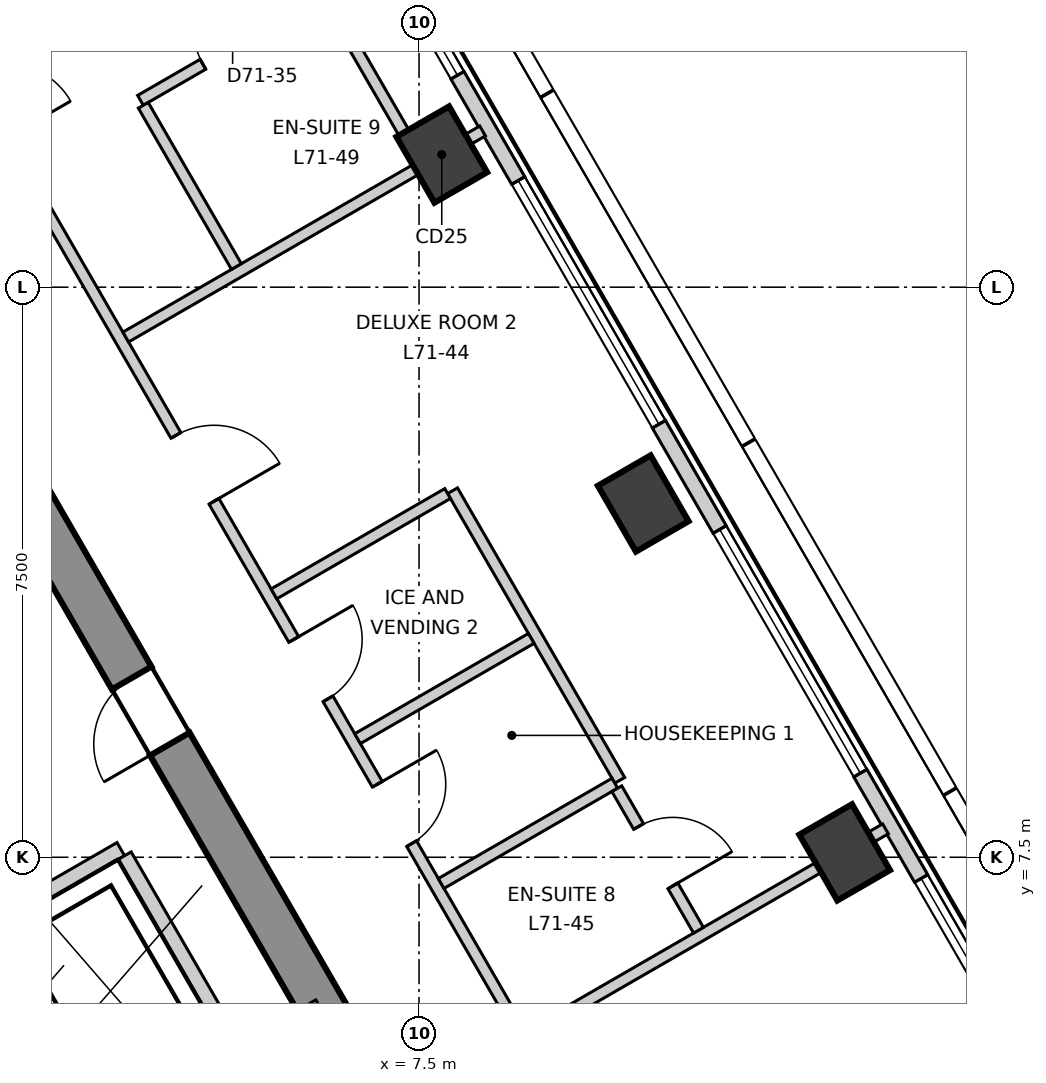
"""IFC4 building model, lengths in metres.
Left out: names, types, materials, properties, quantities, classifications, styles, units other than length and angle.
Written with IfcOpenShell. Run it as: python <this file> out.ifc"""

import sys

from ifc_helpers import new_model, si_unit, direction, frame, frame_2d, origin, origin_2d, place, context, subcontext, project, spatial, polyline, rectangle, outline, extrude, element, fill, save


model = new_model("IFC4")
c1 = context("Model", 3, precision=1e-05, world=origin(), true_north=direction((0.0, 1.0)))
c2 = subcontext(c1, "Body", "Model", "MODEL_VIEW")
j1 = project(units=[si_unit("LENGTHUNIT", "METRE"), si_unit("PLANEANGLEUNIT", "RADIAN")], contexts=[c1])
p1 = place(None, origin())
s1 = spatial("IfcSite", under=j1, at=p1, CompositionType="ELEMENT")
p2 = place(p1, origin())
s2 = spatial("IfcBuilding", under=s1, at=p2, CompositionType="ELEMENT")
p3 = place(p2, frame((0.0, 0.0, 300.7)))
s3 = spatial("IfcBuildingStorey", under=s2, at=p3, CompositionType="ELEMENT", Elevation=300.7)
p4 = place(p3, frame((12.384, -5.15, -0.3), z_axis=(0.0, 0.0, 1.0), x_axis=(-0.500000539815, 0.866025092122, 0.0)))
e1 = element("IfcWall", 1, at=p4, inside=s3, PredefinedType="SHEAR", context=c2, shape_type="SweptSolid", body=[
    extrude(outline(polyline([(-0.173, -0.301), (1.795, -0.301), (3.763, -0.301), (5.731, -0.301), (7.7, -0.301), (9.668, -0.301), (11.636, -0.301), (13.604, -0.3), (15.573, -0.3), (17.541, -0.3), (19.509, -0.3), (21.477, -0.3), (21.131, 0.3), (19.226, 0.3), (17.321, 0.3), (15.415, 0.3), (13.51, 0.3), (11.605, 0.3), (9.699, 0.3), (7.794, 0.3), (5.889, 0.3), (3.984, 0.3), (2.078, 0.3), (0.173, 0.3), (-0.173, -0.301)])), origin(), (0.0, 0.0, 1.0), 3.6),
])
p5 = place(p4, frame((16.328, 0.0, 0.3)))
e2 = element("IfcOpeningElement", 2, at=p5, cuts=e1, PredefinedType="OPENING", context=c2, shape_type="SweptSolid", body=[
    extrude(rectangle(XDim=1.0, YDim=2.1, at=frame_2d((0.5, 1.05))), frame((0.0, 0.31, 0.0), z_axis=(0.0, -1.0, 0.0), x_axis=(1.0, 0.0, 0.0)), (0.0, 0.0, 1.0), 0.621),
])
p6 = place(p4, frame((4.777, 0.0, 0.3)))
e3 = element("IfcOpeningElement", 3, at=p6, cuts=e1, PredefinedType="OPENING", context=c2, shape_type="SweptSolid", body=[
    extrude(rectangle(XDim=0.9, YDim=2.1, at=frame_2d((0.45, 1.05))), frame((0.0, 0.31, 0.0), z_axis=(0.0, -1.0, 0.0), x_axis=(1.0, 0.0, 0.0)), (0.0, 0.0, 1.0), 0.621),
])
for number, where, z_axis, x_axis in (
    (4, (13.1, 7.564, -0.3), (0.0, 0.0, 1.0), (-0.5, 0.866, 0.0)),
    (5, (10.45, 12.154, -0.3), (0.0, 0.0, 1.0), (-0.5, 0.866, 0.0)),
    (6, (7.799, 16.745, -0.3), (0.0, 0.0, 1.0), (-0.5, 0.866, 0.0)),
):
    element("IfcColumn", number, at=place(p3, frame(where, z_axis=z_axis, x_axis=x_axis)), inside=s3, PredefinedType="COLUMN", context=c2, shape_type="SweptSolid", body=[
        extrude(rectangle(XDim=1.0, YDim=0.8, at=origin_2d()), origin(), (0.0, 0.0, 1.0), 3.6),
    ])
p7 = place(p3, frame((24.96, -11.578, 0.0), z_axis=(0.0, 0.0, 1.0), x_axis=(-0.500002391419, 0.866024023094, 0.0)))
e7 = element("IfcWall", 7, at=p7, inside=s3, PredefinedType="ELEMENTEDWALL", context=c2, shape_type="SweptSolid", body=[
    extrude(rectangle(XDim=44.994, YDim=0.2, at=frame_2d((22.497, 0.0))), origin(), (0.0, 0.0, 1.0), 3.3),
])
p8 = place(p7, frame((2.103, 0.0, 0.9)))
e8 = element("IfcOpeningElement", 8, at=p8, cuts=e7, PredefinedType="OPENING", context=c2, shape_type="SweptSolid", body=[
    extrude(rectangle(XDim=3.7, YDim=2.2, at=frame_2d((1.85, 1.1))), frame((0.0, 0.11, 0.0), z_axis=(0.0, -1.0, 0.0), x_axis=(1.0, 0.0, 0.0)), (0.0, 0.0, 1.0), 0.22),
])
p9 = place(p7, frame((7.404, 0.0, 0.9)))
e9 = element("IfcOpeningElement", 9, at=p9, cuts=e7, PredefinedType="OPENING", context=c2, shape_type="SweptSolid", body=[
    extrude(rectangle(XDim=3.7, YDim=2.2, at=frame_2d((1.85, 1.1))), frame((0.0, 0.11, 0.0), z_axis=(0.0, -1.0, 0.0), x_axis=(1.0, 0.0, 0.0)), (0.0, 0.0, 1.0), 0.22),
])
p10 = place(p7, frame((12.705, 0.0, 0.9)))
e10 = element("IfcOpeningElement", 10, at=p10, cuts=e7, PredefinedType="OPENING", context=c2, shape_type="SweptSolid", body=[
    extrude(rectangle(XDim=3.7, YDim=2.2, at=frame_2d((1.85, 1.1))), frame((0.0, 0.11, 0.0), z_axis=(0.0, -1.0, 0.0), x_axis=(1.0, 0.0, 0.0)), (0.0, 0.0, 1.0), 0.22),
])
p11 = place(p7, frame((18.006, 0.0, 0.9)))
e11 = element("IfcOpeningElement", 11, at=p11, cuts=e7, PredefinedType="OPENING", context=c2, shape_type="SweptSolid", body=[
    extrude(rectangle(XDim=3.7, YDim=2.2, at=frame_2d((1.85, 1.1))), frame((0.0, 0.11, 0.0), z_axis=(0.0, -1.0, 0.0), x_axis=(1.0, 0.0, 0.0)), (0.0, 0.0, 1.0), 0.22),
])
p12 = place(p7, frame((23.308, 0.0, 0.9)))
e12 = element("IfcOpeningElement", 12, at=p12, cuts=e7, PredefinedType="OPENING", context=c2, shape_type="SweptSolid", body=[
    extrude(rectangle(XDim=3.7, YDim=2.2, at=frame_2d((1.85, 1.1))), frame((0.0, 0.11, 0.0), z_axis=(0.0, -1.0, 0.0), x_axis=(1.0, 0.0, 0.0)), (0.0, 0.0, 1.0), 0.22),
])
p13 = place(p7, frame((28.609, 0.0, 0.9)))
e13 = element("IfcOpeningElement", 13, at=p13, cuts=e7, PredefinedType="OPENING", context=c2, shape_type="SweptSolid", body=[
    extrude(rectangle(XDim=3.7, YDim=2.2, at=frame_2d((1.85, 1.1))), frame((0.0, 0.11, 0.0), z_axis=(0.0, -1.0, 0.0), x_axis=(1.0, 0.0, 0.0)), (0.0, 0.0, 1.0), 0.22),
])
p14 = place(p7, frame((33.91, 0.0, 0.9)))
e14 = element("IfcOpeningElement", 14, at=p14, cuts=e7, PredefinedType="OPENING", context=c2, shape_type="SweptSolid", body=[
    extrude(rectangle(XDim=3.7, YDim=2.2, at=frame_2d((1.85, 1.1))), frame((0.0, 0.11, 0.0), z_axis=(0.0, -1.0, 0.0), x_axis=(1.0, 0.0, 0.0)), (0.0, 0.0, 1.0), 0.22),
])
p15 = place(p7, frame((39.211, 0.0, 0.9)))
e15 = element("IfcOpeningElement", 15, at=p15, cuts=e7, PredefinedType="OPENING", context=c2, shape_type="SweptSolid", body=[
    extrude(rectangle(XDim=3.7, YDim=2.2, at=frame_2d((1.85, 1.1))), frame((0.0, 0.11, 0.0), z_axis=(0.0, -1.0, 0.0), x_axis=(1.0, 0.0, 0.0)), (0.0, 0.0, 1.0), 0.22),
])
p16 = place(p3, frame((8.942, 5.163, 0.0), z_axis=(0.0, 0.0, 1.0), x_axis=(0.866006352826, 0.500032995777, 0.0)))
e16 = element("IfcWall", 16, at=p16, inside=s3, PredefinedType="PARTITIONING", context=c2, shape_type="SweptSolid", body=[
    extrude(rectangle(XDim=5.422, YDim=0.15, at=frame_2d((2.711, 0.0))), origin(), (0.0, 0.0, 1.0), 2.8),
])
p17 = place(p3, frame((0.075, 20.37, 0.0), z_axis=(0.0, 0.0, 1.0), x_axis=(0.500009775255, -0.866019759965, 0.0)))
e17 = element("IfcWall", 17, at=p17, inside=s3, PredefinedType="PARTITIONING", context=c2, shape_type="SweptSolid", body=[
    extrude(rectangle(XDim=35.207, YDim=0.15, at=frame_2d((17.604, 0.0))), origin(), (0.0, 0.0, 1.0), 3.3),
])
p18 = place(p17, frame((31.307, 0.0, 0.0)))
e18 = element("IfcOpeningElement", 18, at=p18, cuts=e17, PredefinedType="OPENING", context=c2, shape_type="SweptSolid", body=[
    extrude(rectangle(XDim=1.0, YDim=2.1, at=frame_2d((0.5, 1.05))), frame((0.0, 0.085, 0.0), z_axis=(0.0, -1.0, 0.0), x_axis=(1.0, 0.0, 0.0)), (0.0, 0.0, 1.0), 0.17),
])
p19 = place(p17, frame((20.355, 0.0, 0.0)))
e19 = element("IfcOpeningElement", 19, at=p19, cuts=e17, PredefinedType="OPENING", context=c2, shape_type="SweptSolid", body=[
    extrude(rectangle(XDim=1.0, YDim=2.1, at=frame_2d((0.5, 1.05))), frame((0.0, 0.085, 0.0), z_axis=(0.0, -1.0, 0.0), x_axis=(1.0, 0.0, 0.0)), (0.0, 0.0, 1.0), 0.17),
])
p20 = place(p17, frame((24.355, 0.0, 0.0)))
e20 = element("IfcOpeningElement", 20, at=p20, cuts=e17, PredefinedType="OPENING", context=c2, shape_type="SweptSolid", body=[
    extrude(rectangle(XDim=0.9, YDim=2.1, at=frame_2d((0.45, 1.05))), frame((0.0, 0.085, 0.0), z_axis=(0.0, -1.0, 0.0), x_axis=(1.0, 0.0, 0.0)), (0.0, 0.0, 1.0), 0.17),
])
p21 = place(p17, frame((22.255, 0.0, 0.0)))
e21 = element("IfcOpeningElement", 21, at=p21, cuts=e17, PredefinedType="OPENING", context=c2, shape_type="SweptSolid", body=[
    extrude(rectangle(XDim=0.9, YDim=2.1, at=frame_2d((0.45, 1.05))), frame((0.0, 0.085, 0.0), z_axis=(0.0, -1.0, 0.0), x_axis=(1.0, 0.0, 0.0)), (0.0, 0.0, 1.0), 0.17),
])
p22 = place(p17, frame((8.453, 0.0, 0.0)))
e22 = element("IfcOpeningElement", 22, at=p22, cuts=e17, PredefinedType="OPENING", context=c2, shape_type="SweptSolid", body=[
    extrude(rectangle(XDim=1.0, YDim=2.1, at=frame_2d((0.5, 1.05))), frame((0.0, 0.085, 0.0), z_axis=(0.0, -1.0, 0.0), x_axis=(1.0, 0.0, 0.0)), (0.0, 0.0, 1.0), 0.17),
])
p23 = place(p17, frame((13.753, 0.0, 0.0)))
e23 = element("IfcOpeningElement", 23, at=p23, cuts=e17, PredefinedType="OPENING", context=c2, shape_type="SweptSolid", body=[
    extrude(rectangle(XDim=0.9, YDim=2.1, at=frame_2d((0.45, 1.05))), frame((0.0, 0.085, 0.0), z_axis=(0.0, -1.0, 0.0), x_axis=(1.0, 0.0, 0.0)), (0.0, 0.0, 1.0), 0.17),
])
p24 = place(p17, frame((11.553, 0.0, 0.0)))
e24 = element("IfcOpeningElement", 24, at=p24, cuts=e17, PredefinedType="OPENING", context=c2, shape_type="SweptSolid", body=[
    extrude(rectangle(XDim=0.9, YDim=2.1, at=frame_2d((0.45, 1.05))), frame((0.0, 0.085, 0.0), z_axis=(0.0, -1.0, 0.0), x_axis=(1.0, 0.0, 0.0)), (0.0, 0.0, 1.0), 0.17),
])
p25 = place(p17, frame((2.951, 0.0, 0.0)))
e25 = element("IfcOpeningElement", 25, at=p25, cuts=e17, PredefinedType="OPENING", context=c2, shape_type="SweptSolid", body=[
    extrude(rectangle(XDim=1.0, YDim=2.1, at=frame_2d((0.5, 1.05))), frame((0.0, 0.085, 0.0), z_axis=(0.0, -1.0, 0.0), x_axis=(1.0, 0.0, 0.0)), (0.0, 0.0, 1.0), 0.17),
])
p26 = place(p3, frame((3.641, 14.344, 0.0), z_axis=(0.0, 0.0, 1.0), x_axis=(0.865995092734, 0.500052496605, 0.0)))
e26 = element("IfcWall", 26, at=p26, inside=s3, PredefinedType="PARTITIONING", context=c2, shape_type="SweptSolid", body=[
    extrude(rectangle(XDim=5.421, YDim=0.15, at=frame_2d((2.711, 0.0))), origin(), (0.0, 0.0, 1.0), 3.3),
])
p27 = place(p3, frame((7.941, 12.322, 0.0), z_axis=(0.0, 0.0, 1.0), x_axis=(0.500077893725, -0.86598042715, 0.0)))
e27 = element("IfcWall", 27, at=p27, inside=s3, PredefinedType="PARTITIONING", context=c2, shape_type="SweptSolid", body=[
    extrude(rectangle(XDim=4.4, YDim=0.15, at=frame_2d((2.2, 0.0))), origin(), (0.0, 0.0, 1.0), 3.3),
])
p28 = place(p3, frame((5.591, 10.965, 0.0), z_axis=(0.0, 0.0, 1.0), x_axis=(0.86592206805, 0.500178940045, 0.0)))
e28 = element("IfcWall", 28, at=p28, inside=s3, PredefinedType="PARTITIONING", context=c2, shape_type="SweptSolid", body=[
    extrude(rectangle(XDim=2.639, YDim=0.15, at=frame_2d((1.319, 0.0))), origin(), (0.0, 0.0, 1.0), 3.3),
])
for number, where, z_axis, x_axis in (
    (29, (6.691, 9.06, 0.0), (0.0, 0.0, 1.0), (0.866, 0.5, 0.0)),
    (30, (7.791, 7.155, 0.0), (0.0, 0.0, 1.0), (0.866, 0.5, 0.0)),
):
    element("IfcWall", number, at=place(p3, frame(where, z_axis=z_axis, x_axis=x_axis)), inside=s3, PredefinedType="PARTITIONING", context=c2, shape_type="SweptSolid", body=[
        extrude(rectangle(XDim=2.638, YDim=0.15, at=frame_2d((1.319, 0.0))), origin(), (0.0, 0.0, 1.0), 3.3),
    ])
p29 = place(p3, frame((6.249, 18.853, 0.0), z_axis=(0.0, 0.0, 1.0), x_axis=(0.500079482444, -0.865979509711, 0.0)))
e31 = element("IfcWall", 31, at=p29, inside=s3, PredefinedType="PARTITIONING", context=c2, shape_type="SweptSolid", body=[
    extrude(rectangle(XDim=2.525, YDim=0.15, at=frame_2d((1.263, 0.0))), origin(), (0.0, 0.0, 1.0), 2.6),
])
p30 = place(p3, frame((3.835, 17.458, 0.0), z_axis=(0.0, 0.0, 1.0), x_axis=(0.866008795918, 0.500028764566, 0.0)))
e32 = element("IfcWall", 32, at=p30, inside=s3, PredefinedType="PARTITIONING", context=c2, shape_type="SweptSolid", body=[
    extrude(rectangle(XDim=2.714, YDim=0.15, at=frame_2d((1.357, 0.0))), origin(), (0.0, 0.0, 1.0), 3.3),
])
p31 = place(p30, frame((0.95, 0.0, 0.0)))
e33 = element("IfcOpeningElement", 33, at=p31, cuts=e32, PredefinedType="OPENING", context=c2, shape_type="SweptSolid", body=[
    extrude(rectangle(XDim=0.9, YDim=2.1, at=frame_2d((0.45, 1.05))), frame((0.0, 0.085, 0.0), z_axis=(0.0, -1.0, 0.0), x_axis=(1.0, 0.0, 0.0)), (0.0, 0.0, 1.0), 0.17),
])
p32 = place(p3, frame((3.872, 17.393, 0.0), z_axis=(0.0, 0.0, 1.0), x_axis=(0.500073324283, -0.865983065851, 0.0)))
e34 = element("IfcWall", 34, at=p32, inside=s3, PredefinedType="PARTITIONING", context=c2, shape_type="SweptSolid", body=[
    extrude(rectangle(XDim=2.449, YDim=0.15, at=frame_2d((1.225, 0.0))), origin(), (0.0, 0.0, 1.0), 3.3),
])
p33 = place(p3, frame((10.102, 8.402, 0.0), z_axis=(0.0, 0.0, 1.0), x_axis=(0.499961633463, -0.866047553582, 0.0)))
e35 = element("IfcWall", 35, at=p33, inside=s3, PredefinedType="PARTITIONING", context=c2, shape_type="SweptSolid", body=[
    extrude(rectangle(XDim=2.15, YDim=0.15, at=frame_2d((1.075, 0.0))), origin(), (0.0, 0.0, 1.0), 3.3),
])
p34 = place(p33, frame((0.575, 0.0, 0.0)))
e36 = element("IfcOpeningElement", 36, at=p34, cuts=e35, PredefinedType="OPENING", context=c2, shape_type="SweptSolid", body=[
    extrude(rectangle(XDim=0.9, YDim=2.1, at=frame_2d((0.45, 1.05))), frame((0.0, 0.085, 0.0), z_axis=(0.0, -1.0, 0.0), x_axis=(1.0, 0.0, 0.0)), (0.0, 0.0, 1.0), 0.17),
])
p35 = place(p3, frame((-0.002, 5.541, 0.0), z_axis=(0.0, 0.0, 1.0), x_axis=(0.86600155993, 0.500041296494, 0.0)))
e37 = element("IfcWall", 37, at=p35, inside=s3, PredefinedType="SOLIDWALL", context=c2, shape_type="SweptSolid", body=[
    extrude(rectangle(XDim=4.132, YDim=0.2, at=frame_2d((2.066, 0.0))), origin(), (0.0, 0.0, 1.0), 3.3),
])
p36 = place(p3, frame((1.578, 2.874, 0.0), z_axis=(0.0, 0.0, 1.0), x_axis=(0.866045911672, 0.499964477614, 0.0)))
e38 = element("IfcWall", 38, at=p36, inside=s3, PredefinedType="SOLIDWALL", context=c2, shape_type="SweptSolid", body=[
    extrude(rectangle(XDim=5.327, YDim=0.2, at=frame_2d((2.663, 0.0))), origin(), (0.0, 0.0, 1.0), 3.3),
])
p37 = place(p36, frame((2.496, 0.0, 0.0)))
e39 = element("IfcOpeningElement", 39, at=p37, cuts=e38, PredefinedType="OPENING", context=c2, shape_type="SweptSolid", body=[
    extrude(rectangle(XDim=1.1, YDim=2.1, at=frame_2d((0.55, 1.05))), frame((0.0, 0.11, 0.0), z_axis=(0.0, -1.0, 0.0), x_axis=(1.0, 0.0, 0.0)), (0.0, 0.0, 1.0), 0.22),
])
for number, where, z_axis, x_axis in (
    (40, (3.626, 7.52, 0.0), (0.0, 0.0, 1.0), (0.5, -0.866, 0.0)),
    (41, (1.807, 6.47, 0.0), (0.0, 0.0, 1.0), (0.5, -0.866, 0.0)),
):
    element("IfcWall", number, at=place(p3, frame(where, z_axis=z_axis, x_axis=x_axis)), inside=s3, PredefinedType="SOLIDWALL", context=c2, shape_type="SweptSolid", body=[
        extrude(rectangle(XDim=2.9, YDim=0.2, at=frame_2d((1.45, 0.0))), origin(), (0.0, 0.0, 1.0), 3.3),
    ])
p38 = place(p11, origin())
e42 = element("IfcWindow", 42, at=p38, inside=s3, PartitioningType="SINGLE_PANEL", PredefinedType="WINDOW", context=c2, shape_type="SweptSolid", body=[
    extrude(rectangle(XDim=3.7, YDim=2.2, at=frame_2d((1.85, 1.1))), frame((0.0, 0.03, 0.0), z_axis=(0.0, -1.0, 0.0), x_axis=(1.0, 0.0, 0.0)), (0.0, 0.0, 1.0), 0.06),
])
fill(e11, e42)
p39 = place(p12, origin())
e43 = element("IfcWindow", 43, at=p39, inside=s3, PartitioningType="SINGLE_PANEL", PredefinedType="WINDOW", context=c2, shape_type="SweptSolid", body=[
    extrude(rectangle(XDim=3.7, YDim=2.2, at=frame_2d((1.85, 1.1))), frame((0.0, 0.03, 0.0), z_axis=(0.0, -1.0, 0.0), x_axis=(1.0, 0.0, 0.0)), (0.0, 0.0, 1.0), 0.06),
])
fill(e12, e43)
p40 = place(p13, origin())
e44 = element("IfcWindow", 44, at=p40, inside=s3, PartitioningType="SINGLE_PANEL", PredefinedType="WINDOW", context=c2, shape_type="SweptSolid", body=[
    extrude(rectangle(XDim=3.7, YDim=2.2, at=frame_2d((1.85, 1.1))), frame((0.0, 0.03, 0.0), z_axis=(0.0, -1.0, 0.0), x_axis=(1.0, 0.0, 0.0)), (0.0, 0.0, 1.0), 0.06),
])
fill(e13, e44)
p41 = place(p14, origin())
e45 = element("IfcWindow", 45, at=p41, inside=s3, PartitioningType="SINGLE_PANEL", PredefinedType="WINDOW", context=c2, shape_type="SweptSolid", body=[
    extrude(rectangle(XDim=3.7, YDim=2.2, at=frame_2d((1.85, 1.1))), frame((0.0, 0.03, 0.0), z_axis=(0.0, -1.0, 0.0), x_axis=(1.0, 0.0, 0.0)), (0.0, 0.0, 1.0), 0.06),
])
fill(e14, e45)
p42 = place(p22, origin())
e46 = element("IfcDoor", 46, at=p42, inside=s3, OperationType="SINGLE_SWING_LEFT", PredefinedType="DOOR", context=c2, shape_type="SweptSolid", body=[
    extrude(rectangle(XDim=1.0, YDim=2.1, at=frame_2d((0.5, 1.05))), frame((0.0, 0.025, 0.0), z_axis=(0.0, -1.0, 0.0), x_axis=(1.0, 0.0, 0.0)), (0.0, 0.0, 1.0), 0.05),
])
fill(e22, e46)
p43 = place(p34, origin())
e47 = element("IfcDoor", 47, at=p43, inside=s3, OperationType="SINGLE_SWING_LEFT", PredefinedType="DOOR", context=c2, shape_type="SweptSolid", body=[
    extrude(rectangle(XDim=0.9, YDim=2.1, at=frame_2d((0.45, 1.05))), frame((0.0, 0.025, 0.0), z_axis=(0.0, -1.0, 0.0), x_axis=(1.0, 0.0, 0.0)), (0.0, 0.0, 1.0), 0.05),
])
fill(e36, e47)
p44 = place(p23, origin())
e48 = element("IfcDoor", 48, at=p44, inside=s3, OperationType="SINGLE_SWING_RIGHT", PredefinedType="DOOR", context=c2, shape_type="SweptSolid", body=[
    extrude(rectangle(XDim=0.9, YDim=2.1, at=frame_2d((0.45, 1.05))), frame((0.0, 0.025, 0.0), z_axis=(0.0, -1.0, 0.0), x_axis=(1.0, 0.0, 0.0)), (0.0, 0.0, 1.0), 0.05),
])
fill(e23, e48)
p45 = place(p24, origin())
e49 = element("IfcDoor", 49, at=p45, inside=s3, OperationType="SINGLE_SWING_RIGHT", PredefinedType="DOOR", context=c2, shape_type="SweptSolid", body=[
    extrude(rectangle(XDim=0.9, YDim=2.1, at=frame_2d((0.45, 1.05))), frame((0.0, 0.025, 0.0), z_axis=(0.0, -1.0, 0.0), x_axis=(1.0, 0.0, 0.0)), (0.0, 0.0, 1.0), 0.05),
])
fill(e24, e49)
p46 = place(p31, origin())
e50 = element("IfcDoor", 50, at=p46, inside=s3, OperationType="SINGLE_SWING_LEFT", PredefinedType="DOOR", context=c2, shape_type="SweptSolid", body=[
    extrude(rectangle(XDim=0.9, YDim=2.1, at=frame_2d((0.45, 1.05))), frame((0.0, 0.025, 0.0), z_axis=(0.0, -1.0, 0.0), x_axis=(1.0, 0.0, 0.0)), (0.0, 0.0, 1.0), 0.05),
])
fill(e33, e50)
p47 = place(p5, origin())
e51 = element("IfcDoor", 51, at=p47, inside=s3, OperationType="SINGLE_SWING_RIGHT", PredefinedType="DOOR", context=c2, shape_type="SweptSolid", body=[
    extrude(rectangle(XDim=1.0, YDim=2.1, at=frame_2d((0.5, 1.05))), frame((0.0, 0.025, 0.0), z_axis=(0.0, -1.0, 0.0), x_axis=(1.0, 0.0, 0.0)), (0.0, 0.0, 1.0), 0.05),
])
fill(e2, e51)
save(model, sys.argv[1])
